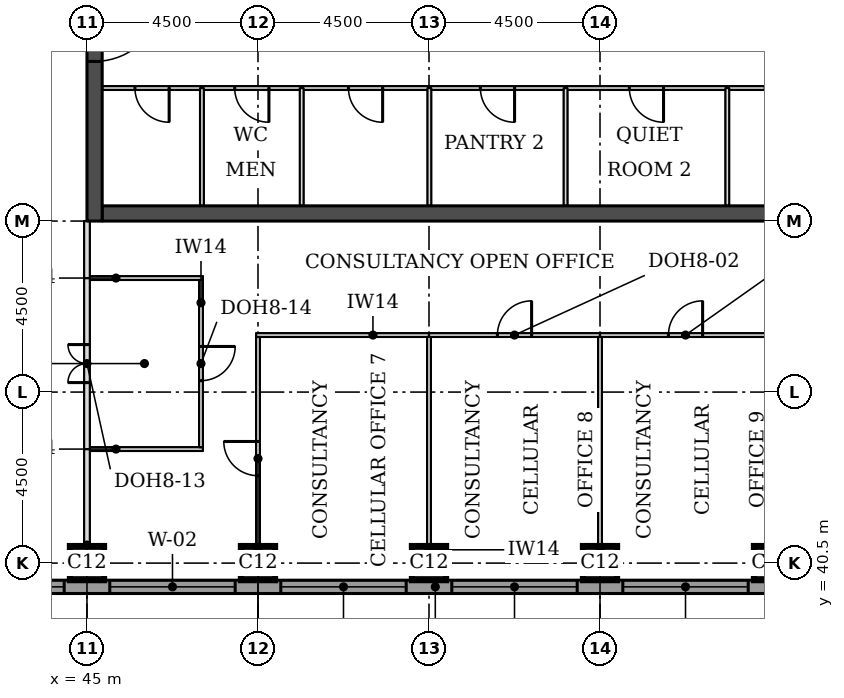
"""IFC4 building model, lengths in metres.
Left out: names, types, materials, properties, quantities, classifications, styles, units other than length and angle.
Written with IfcOpenShell. Run it as: python <this file> out.ifc"""

import sys

from ifc_helpers import new_model, si_unit, direction, frame, frame_2d, origin, origin_2d, place, context, subcontext, project, spatial, rectangle, extrude, element, fill, save


model = new_model("IFC4")
c1 = context("Model", 3, precision=1e-05, world=origin(), true_north=direction((0.0, 1.0)))
c2 = subcontext(c1, "Body", "Model", "MODEL_VIEW")
j1 = project(units=[si_unit("LENGTHUNIT", "METRE"), si_unit("PLANEANGLEUNIT", "RADIAN")], contexts=[c1])
p1 = place(None, origin())
s1 = spatial("IfcSite", under=j1, at=p1, CompositionType="ELEMENT")
p2 = place(p1, origin())
s2 = spatial("IfcBuilding", under=s1, at=p2, CompositionType="ELEMENT")
p3 = place(p2, frame((0.0, 0.0, 203.2)))
s3 = spatial("IfcBuildingStorey", under=s2, at=p3, CompositionType="ELEMENT", Elevation=203.2)
for number, where, z_axis, x_axis in (
    (1, (45.0, 40.5, 0.0), (0.0, 0.0, 1.0), (1.0, 0.0, 0.0)),
    (2, (49.5, 40.5, 0.0), (0.0, 0.0, 1.0), (1.0, 0.0, 0.0)),
    (3, (54.0, 40.5, 0.0), (0.0, 0.0, 1.0), (1.0, 0.0, 0.0)),
    (4, (58.5, 40.5, 0.0), (0.0, 0.0, 1.0), (1.0, 0.0, 0.0)),
    (5, (63.0, 40.5, 0.0), (0.0, 0.0, 1.0), (1.0, 0.0, 0.0)),
):
    element("IfcColumn", number, at=place(p3, frame(where, z_axis=z_axis, x_axis=x_axis)), inside=s3, PredefinedType="COLUMN", context=c2, shape_type="SweptSolid", body=[
        extrude(rectangle(XDim=0.9, YDim=0.9, at=origin_2d()), origin(), (0.0, 0.0, 1.0), 3.7),
    ])
p4 = place(p3, frame((45.4, 49.7, 0.0), z_axis=(0.0, 0.0, 1.0), x_axis=(1.0, 0.0, 0.0)))
e6 = element("IfcWall", 6, at=p4, inside=s3, PredefinedType="SHEAR", context=c2, shape_type="SweptSolid", body=[
    extrude(rectangle(XDim=21.7, YDim=0.4, at=frame_2d((10.85, 0.0))), origin(), (0.0, 0.0, 1.0), 3.7),
])
p5 = place(p3, frame((45.2, 49.5, 0.0), z_axis=(0.0, 0.0, 1.0), x_axis=(0.0, 1.0, 0.0)))
e7 = element("IfcWall", 7, at=p5, inside=s3, PredefinedType="SHEAR", context=c2, shape_type="SweptSolid", body=[
    extrude(rectangle(XDim=22.5, YDim=0.4, at=frame_2d((11.25, 0.0))), origin(), (0.0, 0.0, 1.0), 3.7),
])
p6 = place(p5, frame((4.2, 0.0, 0.0)))
e8 = element("IfcOpeningElement", 8, at=p6, cuts=e7, PredefinedType="OPENING", context=c2, shape_type="SweptSolid", body=[
    extrude(rectangle(XDim=1.8, YDim=2.1, at=frame_2d((0.9, 1.05))), frame((0.0, 0.21, 0.0), z_axis=(0.0, -1.0, 0.0), x_axis=(1.0, 0.0, 0.0)), (0.0, 0.0, 1.0), 0.42),
])
p7 = place(p5, frame((6.9, 0.0, 0.0)))
e9 = element("IfcOpeningElement", 9, at=p7, cuts=e7, PredefinedType="OPENING", context=c2, shape_type="SweptSolid", body=[
    extrude(rectangle(XDim=1.1, YDim=2.1, at=frame_2d((0.55, 1.05))), frame((0.0, 0.21, 0.0), z_axis=(0.0, -1.0, 0.0), x_axis=(1.0, 0.0, 0.0)), (0.0, 0.0, 1.0), 0.42),
])
p8 = place(p5, frame((13.6, 0.0, 0.0)))
e10 = element("IfcOpeningElement", 10, at=p8, cuts=e7, PredefinedType="OPENING", context=c2, shape_type="SweptSolid", body=[
    extrude(rectangle(XDim=1.1, YDim=2.1, at=frame_2d((0.55, 1.05))), frame((0.0, 0.21, 0.0), z_axis=(0.0, -1.0, 0.0), x_axis=(1.0, 0.0, 0.0)), (0.0, 0.0, 1.0), 0.42),
])
p9 = place(p5, frame((16.5, 0.0, 0.0)))
e11 = element("IfcOpeningElement", 11, at=p9, cuts=e7, PredefinedType="OPENING", context=c2, shape_type="SweptSolid", body=[
    extrude(rectangle(XDim=1.8, YDim=2.1, at=frame_2d((0.9, 1.05))), frame((0.0, 0.21, 0.0), z_axis=(0.0, -1.0, 0.0), x_axis=(1.0, 0.0, 0.0)), (0.0, 0.0, 1.0), 0.42),
])
p10 = place(p3, frame((36.0, 39.875, 0.0), z_axis=(0.0, 0.0, 1.0), x_axis=(1.0, 0.0, 0.0)))
e12 = element("IfcWall", 12, at=p10, inside=s3, PredefinedType="STANDARD", context=c2, shape_type="SweptSolid", body=[
    extrude(rectangle(XDim=36.331, YDim=0.35, at=frame_2d((18.166, 0.0))), origin(), (0.0, 0.0, 1.0), 3.525),
])
p11 = place(p10, frame((5.1, 0.0, 0.9)))
e13 = element("IfcOpeningElement", 13, at=p11, cuts=e12, PredefinedType="OPENING", context=c2, shape_type="SweptSolid", body=[
    extrude(rectangle(XDim=3.3, YDim=1.9, at=frame_2d((1.65, 0.95))), frame((0.0, 0.185, 0.0), z_axis=(0.0, -1.0, 0.0), x_axis=(1.0, 0.0, 0.0)), (0.0, 0.0, 1.0), 0.37),
])
p12 = place(p10, frame((9.6, 0.0, 0.9)))
e14 = element("IfcOpeningElement", 14, at=p12, cuts=e12, PredefinedType="OPENING", context=c2, shape_type="SweptSolid", body=[
    extrude(rectangle(XDim=3.3, YDim=1.9, at=frame_2d((1.65, 0.95))), frame((0.0, 0.185, 0.0), z_axis=(0.0, -1.0, 0.0), x_axis=(1.0, 0.0, 0.0)), (0.0, 0.0, 1.0), 0.37),
])
p13 = place(p10, frame((14.1, 0.0, 0.9)))
e15 = element("IfcOpeningElement", 15, at=p13, cuts=e12, PredefinedType="OPENING", context=c2, shape_type="SweptSolid", body=[
    extrude(rectangle(XDim=3.3, YDim=1.9, at=frame_2d((1.65, 0.95))), frame((0.0, 0.185, 0.0), z_axis=(0.0, -1.0, 0.0), x_axis=(1.0, 0.0, 0.0)), (0.0, 0.0, 1.0), 0.37),
])
p14 = place(p10, frame((18.6, 0.0, 0.9)))
e16 = element("IfcOpeningElement", 16, at=p14, cuts=e12, PredefinedType="OPENING", context=c2, shape_type="SweptSolid", body=[
    extrude(rectangle(XDim=3.3, YDim=1.9, at=frame_2d((1.65, 0.95))), frame((0.0, 0.185, 0.0), z_axis=(0.0, -1.0, 0.0), x_axis=(1.0, 0.0, 0.0)), (0.0, 0.0, 1.0), 0.37),
])
p15 = place(p10, frame((23.1, 0.0, 0.9)))
e17 = element("IfcOpeningElement", 17, at=p15, cuts=e12, PredefinedType="OPENING", context=c2, shape_type="SweptSolid", body=[
    extrude(rectangle(XDim=3.3, YDim=1.9, at=frame_2d((1.65, 0.95))), frame((0.0, 0.185, 0.0), z_axis=(0.0, -1.0, 0.0), x_axis=(1.0, 0.0, 0.0)), (0.0, 0.0, 1.0), 0.37),
])
p16 = place(p10, frame((27.6, 0.0, 0.9)))
e18 = element("IfcOpeningElement", 18, at=p16, cuts=e12, PredefinedType="OPENING", context=c2, shape_type="SweptSolid", body=[
    extrude(rectangle(XDim=3.3, YDim=1.9, at=frame_2d((1.65, 0.95))), frame((0.0, 0.185, 0.0), z_axis=(0.0, -1.0, 0.0), x_axis=(1.0, 0.0, 0.0)), (0.0, 0.0, 1.0), 0.37),
])
p17 = place(p3, frame((45.075, 43.5, 0.0), z_axis=(0.0, 0.0, 1.0), x_axis=(1.0, 0.0, 0.0)))
e19 = element("IfcWall", 19, at=p17, inside=s3, PredefinedType="PARTITIONING", context=c2, shape_type="SweptSolid", body=[
    extrude(rectangle(XDim=2.975, YDim=0.1, at=frame_2d((1.488, 0.0))), origin(), (0.0, 0.0, 1.0), 3.55),
])
p18 = place(p3, frame((49.45, 46.5, 0.0), z_axis=(0.0, 0.0, 1.0), x_axis=(1.0, 0.0, 0.0)))
e20 = element("IfcWall", 20, at=p18, inside=s3, PredefinedType="PARTITIONING", context=c2, shape_type="SweptSolid", body=[
    extrude(rectangle(XDim=4.55, YDim=0.1, at=frame_2d((2.275, 0.0))), origin(), (0.0, 0.0, 1.0), 3.55),
])
p19 = place(p3, frame((54.0, 46.5, 0.0), z_axis=(0.0, 0.0, 1.0), x_axis=(1.0, 0.0, 0.0)))
e21 = element("IfcWall", 21, at=p19, inside=s3, PredefinedType="PARTITIONING", context=c2, shape_type="SweptSolid", body=[
    extrude(rectangle(XDim=4.5, YDim=0.1, at=frame_2d((2.25, 0.0))), origin(), (0.0, 0.0, 1.0), 3.55),
])
p20 = place(p19, frame((1.8, 0.0, 0.0)))
e22 = element("IfcOpeningElement", 22, at=p20, cuts=e21, PredefinedType="OPENING", context=c2, shape_type="SweptSolid", body=[
    extrude(rectangle(XDim=0.9, YDim=2.1, at=frame_2d((0.45, 1.05))), frame((0.0, 0.06, 0.0), z_axis=(0.0, -1.0, 0.0), x_axis=(1.0, 0.0, 0.0)), (0.0, 0.0, 1.0), 0.12),
])
p21 = place(p3, frame((58.5, 46.5, 0.0), z_axis=(0.0, 0.0, 1.0), x_axis=(1.0, 0.0, 0.0)))
e23 = element("IfcWall", 23, at=p21, inside=s3, PredefinedType="PARTITIONING", context=c2, shape_type="SweptSolid", body=[
    extrude(rectangle(XDim=4.5, YDim=0.1, at=frame_2d((2.25, 0.0))), origin(), (0.0, 0.0, 1.0), 3.55),
])
p22 = place(p21, frame((1.8, 0.0, 0.0)))
e24 = element("IfcOpeningElement", 24, at=p22, cuts=e23, PredefinedType="OPENING", context=c2, shape_type="SweptSolid", body=[
    extrude(rectangle(XDim=0.9, YDim=2.1, at=frame_2d((0.45, 1.05))), frame((0.0, 0.06, 0.0), z_axis=(0.0, -1.0, 0.0), x_axis=(1.0, 0.0, 0.0)), (0.0, 0.0, 1.0), 0.12),
])
p23 = place(p3, frame((45.075, 48.0, 0.0), z_axis=(0.0, 0.0, 1.0), x_axis=(1.0, 0.0, 0.0)))
e25 = element("IfcWall", 25, at=p23, inside=s3, PredefinedType="PARTITIONING", context=c2, shape_type="SweptSolid", body=[
    extrude(rectangle(XDim=2.975, YDim=0.1, at=frame_2d((1.488, 0.0))), origin(), (0.0, 0.0, 1.0), 3.55),
])
p24 = place(p3, frame((45.0, 40.05, 0.0), z_axis=(0.0, 0.0, 1.0), x_axis=(0.0, 1.0, 0.0)))
e26 = element("IfcWall", 26, at=p24, inside=s3, PredefinedType="PARTITIONING", context=c2, shape_type="SweptSolid", body=[
    extrude(rectangle(XDim=3.45, YDim=0.15, at=frame_2d((1.725, 0.0))), origin(), (0.0, 0.0, 1.0), 2.938),
])
p25 = place(p3, frame((49.5, 40.05, 0.0), z_axis=(0.0, 0.0, 1.0), x_axis=(0.0, 1.0, 0.0)))
e27 = element("IfcWall", 27, at=p25, inside=s3, PredefinedType="PARTITIONING", context=c2, shape_type="SweptSolid", body=[
    extrude(rectangle(XDim=6.4, YDim=0.1, at=frame_2d((3.2, 0.0))), origin(), (0.0, 0.0, 1.0), 3.55),
])
p26 = place(p25, frame((2.75, 0.0, 0.0)))
e28 = element("IfcOpeningElement", 28, at=p26, cuts=e27, PredefinedType="OPENING", context=c2, shape_type="SweptSolid", body=[
    extrude(rectangle(XDim=0.9, YDim=2.1, at=frame_2d((0.45, 1.05))), frame((0.0, 0.06, 0.0), z_axis=(0.0, -1.0, 0.0), x_axis=(1.0, 0.0, 0.0)), (0.0, 0.0, 1.0), 0.12),
])
for number, where, z_axis, x_axis in (
    (29, (54.0, 40.05, 0.0), (0.0, 0.0, 1.0), (0.0, 1.0, 0.0)),
    (30, (58.5, 40.05, 0.0), (0.0, 0.0, 1.0), (0.0, 1.0, 0.0)),
):
    element("IfcWall", number, at=place(p3, frame(where, z_axis=z_axis, x_axis=x_axis)), inside=s3, PredefinedType="PARTITIONING", context=c2, shape_type="SweptSolid", body=[
        extrude(rectangle(XDim=6.4, YDim=0.1, at=frame_2d((3.2, 0.0))), origin(), (0.0, 0.0, 1.0), 3.55),
    ])
p27 = place(p3, frame((45.0, 43.5, 0.0), z_axis=(0.0, 0.0, 1.0), x_axis=(0.0, 1.0, 0.0)))
e31 = element("IfcWall", 31, at=p27, inside=s3, PredefinedType="PARTITIONING", context=c2, shape_type="SweptSolid", body=[
    extrude(rectangle(XDim=4.5, YDim=0.15, at=frame_2d((2.25, 0.0))), origin(), (0.0, 0.0, 1.0), 2.938),
])
p28 = place(p27, frame((1.75, 0.0, 0.0)))
e32 = element("IfcOpeningElement", 32, at=p28, cuts=e31, PredefinedType="OPENING", context=c2, shape_type="SweptSolid", body=[
    extrude(rectangle(XDim=1.0, YDim=2.1, at=frame_2d((0.5, 1.05))), frame((0.0, 0.085, 0.0), z_axis=(0.0, -1.0, 0.0), x_axis=(1.0, 0.0, 0.0)), (0.0, 0.0, 1.0), 0.17),
])
p29 = place(p3, frame((48.0, 43.55, 0.0), z_axis=(0.0, 0.0, 1.0), x_axis=(0.0, 1.0, 0.0)))
e33 = element("IfcWall", 33, at=p29, inside=s3, PredefinedType="PARTITIONING", context=c2, shape_type="SweptSolid", body=[
    extrude(rectangle(XDim=4.4, YDim=0.1, at=frame_2d((2.2, 0.0))), origin(), (0.0, 0.0, 1.0), 3.55),
])
p30 = place(p29, frame((1.75, 0.0, 0.0)))
e34 = element("IfcOpeningElement", 34, at=p30, cuts=e33, PredefinedType="OPENING", context=c2, shape_type="SweptSolid", body=[
    extrude(rectangle(XDim=0.9, YDim=2.1, at=frame_2d((0.45, 1.05))), frame((0.0, 0.06, 0.0), z_axis=(0.0, -1.0, 0.0), x_axis=(1.0, 0.0, 0.0)), (0.0, 0.0, 1.0), 0.12),
])
p31 = place(p3, frame((45.0, 48.0, 0.0), z_axis=(0.0, 0.0, 1.0), x_axis=(0.0, 1.0, 0.0)))
e35 = element("IfcWall", 35, at=p31, inside=s3, PredefinedType="PARTITIONING", context=c2, shape_type="SweptSolid", body=[
    extrude(rectangle(XDim=1.5, YDim=0.15, at=frame_2d((0.75, 0.0))), origin(), (0.0, 0.0, 1.0), 2.938),
])
p32 = place(p3, frame((45.4, 53.0, 0.0), z_axis=(0.0, 0.0, 1.0), x_axis=(1.0, 0.0, 0.0)))
e36 = element("IfcWall", 36, at=p32, inside=s3, PredefinedType="PARTITIONING", context=c2, shape_type="SweptSolid", body=[
    extrude(rectangle(XDim=21.7, YDim=0.1, at=frame_2d((10.85, 0.0))), origin(), (0.0, 0.0, 1.0), 3.55),
])
p33 = place(p32, frame((20.019, 0.0, 0.0)))
e37 = element("IfcOpeningElement", 37, at=p33, cuts=e36, PredefinedType="OPENING", context=c2, shape_type="SweptSolid", body=[
    extrude(rectangle(XDim=1.0, YDim=2.1, at=frame_2d((0.5, 1.05))), frame((0.0, 0.06, 0.0), z_axis=(0.0, -1.0, 0.0), x_axis=(1.0, 0.0, 0.0)), (0.0, 0.0, 1.0), 0.12),
])
p34 = place(p32, frame((17.444, 0.0, 0.0)))
e38 = element("IfcOpeningElement", 38, at=p34, cuts=e36, PredefinedType="OPENING", context=c2, shape_type="SweptSolid", body=[
    extrude(rectangle(XDim=0.9, YDim=2.1, at=frame_2d((0.45, 1.05))), frame((0.0, 0.06, 0.0), z_axis=(0.0, -1.0, 0.0), x_axis=(1.0, 0.0, 0.0)), (0.0, 0.0, 1.0), 0.12),
])
p35 = place(p32, frame((0.863, 0.0, 0.0)))
e39 = element("IfcOpeningElement", 39, at=p35, cuts=e36, PredefinedType="OPENING", context=c2, shape_type="SweptSolid", body=[
    extrude(rectangle(XDim=0.9, YDim=2.1, at=frame_2d((0.45, 1.05))), frame((0.0, 0.06, 0.0), z_axis=(0.0, -1.0, 0.0), x_axis=(1.0, 0.0, 0.0)), (0.0, 0.0, 1.0), 0.12),
])
p36 = place(p32, frame((3.488, 0.0, 0.0)))
e40 = element("IfcOpeningElement", 40, at=p36, cuts=e36, PredefinedType="OPENING", context=c2, shape_type="SweptSolid", body=[
    extrude(rectangle(XDim=0.9, YDim=2.1, at=frame_2d((0.45, 1.05))), frame((0.0, 0.06, 0.0), z_axis=(0.0, -1.0, 0.0), x_axis=(1.0, 0.0, 0.0)), (0.0, 0.0, 1.0), 0.12),
])
p37 = place(p32, frame((6.48, 0.0, 0.0)))
e41 = element("IfcOpeningElement", 41, at=p37, cuts=e36, PredefinedType="OPENING", context=c2, shape_type="SweptSolid", body=[
    extrude(rectangle(XDim=0.9, YDim=2.1, at=frame_2d((0.45, 1.05))), frame((0.0, 0.06, 0.0), z_axis=(0.0, -1.0, 0.0), x_axis=(1.0, 0.0, 0.0)), (0.0, 0.0, 1.0), 0.12),
])
p38 = place(p32, frame((9.952, 0.0, 0.0)))
e42 = element("IfcOpeningElement", 42, at=p38, cuts=e36, PredefinedType="OPENING", context=c2, shape_type="SweptSolid", body=[
    extrude(rectangle(XDim=0.9, YDim=2.1, at=frame_2d((0.45, 1.05))), frame((0.0, 0.06, 0.0), z_axis=(0.0, -1.0, 0.0), x_axis=(1.0, 0.0, 0.0)), (0.0, 0.0, 1.0), 0.12),
])
p39 = place(p32, frame((13.872, 0.0, 0.0)))
e43 = element("IfcOpeningElement", 43, at=p39, cuts=e36, PredefinedType="OPENING", context=c2, shape_type="SweptSolid", body=[
    extrude(rectangle(XDim=0.9, YDim=2.1, at=frame_2d((0.45, 1.05))), frame((0.0, 0.06, 0.0), z_axis=(0.0, -1.0, 0.0), x_axis=(1.0, 0.0, 0.0)), (0.0, 0.0, 1.0), 0.12),
])
for number, where, z_axis, x_axis in (
    (44, (48.025, 49.9, 0.0), (0.0, 0.0, 1.0), (0.0, 1.0, 0.0)),
    (45, (50.65, 49.9, 0.0), (0.0, 0.0, 1.0), (0.0, 1.0, 0.0)),
    (46, (54.01, 49.9, 0.0), (0.0, 0.0, 1.0), (0.0, 1.0, 0.0)),
    (47, (57.594, 49.9, 0.0), (0.0, 0.0, 1.0), (0.0, 1.0, 0.0)),
    (48, (61.85, 49.9, 0.0), (0.0, 0.0, 1.0), (0.0, 1.0, 0.0)),
):
    element("IfcWall", number, at=place(p3, frame(where, z_axis=z_axis, x_axis=x_axis)), inside=s3, PredefinedType="PARTITIONING", context=c2, shape_type="SweptSolid", body=[
        extrude(rectangle(XDim=3.1, YDim=0.1, at=frame_2d((1.55, 0.0))), origin(), (0.0, 0.0, 1.0), 3.55),
    ])
p40 = place(p11, origin())
e49 = element("IfcWindow", 49, at=p40, inside=s3, PartitioningType="SINGLE_PANEL", PredefinedType="WINDOW", context=c2, shape_type="SweptSolid", body=[
    extrude(rectangle(XDim=3.3, YDim=1.9, at=frame_2d((1.65, 0.95))), frame((0.0, 0.085, 0.0), z_axis=(0.0, -1.0, 0.0), x_axis=(1.0, 0.0, 0.0)), (0.0, 0.0, 1.0), 0.06),
])
fill(e13, e49)
p41 = place(p12, origin())
e50 = element("IfcWindow", 50, at=p41, inside=s3, PartitioningType="SINGLE_PANEL", PredefinedType="WINDOW", context=c2, shape_type="SweptSolid", body=[
    extrude(rectangle(XDim=3.3, YDim=1.9, at=frame_2d((1.65, 0.95))), frame((0.0, 0.085, 0.0), z_axis=(0.0, -1.0, 0.0), x_axis=(1.0, 0.0, 0.0)), (0.0, 0.0, 1.0), 0.06),
])
fill(e14, e50)
p42 = place(p13, origin())
e51 = element("IfcWindow", 51, at=p42, inside=s3, PartitioningType="SINGLE_PANEL", PredefinedType="WINDOW", context=c2, shape_type="SweptSolid", body=[
    extrude(rectangle(XDim=3.3, YDim=1.9, at=frame_2d((1.65, 0.95))), frame((0.0, 0.085, 0.0), z_axis=(0.0, -1.0, 0.0), x_axis=(1.0, 0.0, 0.0)), (0.0, 0.0, 1.0), 0.06),
])
fill(e15, e51)
p43 = place(p14, origin())
e52 = element("IfcWindow", 52, at=p43, inside=s3, PartitioningType="SINGLE_PANEL", PredefinedType="WINDOW", context=c2, shape_type="SweptSolid", body=[
    extrude(rectangle(XDim=3.3, YDim=1.9, at=frame_2d((1.65, 0.95))), frame((0.0, 0.085, 0.0), z_axis=(0.0, -1.0, 0.0), x_axis=(1.0, 0.0, 0.0)), (0.0, 0.0, 1.0), 0.06),
])
fill(e16, e52)
p44 = place(p15, origin())
e53 = element("IfcWindow", 53, at=p44, inside=s3, PartitioningType="SINGLE_PANEL", PredefinedType="WINDOW", context=c2, shape_type="SweptSolid", body=[
    extrude(rectangle(XDim=3.3, YDim=1.9, at=frame_2d((1.65, 0.95))), frame((0.0, 0.085, 0.0), z_axis=(0.0, -1.0, 0.0), x_axis=(1.0, 0.0, 0.0)), (0.0, 0.0, 1.0), 0.06),
])
fill(e17, e53)
p45 = place(p28, origin())
e54 = element("IfcDoor", 54, at=p45, inside=s3, OperationType="DOUBLE_DOOR_SINGLE_SWING", PredefinedType="DOOR", context=c2, shape_type="SweptSolid", body=[
    extrude(rectangle(XDim=1.0, YDim=2.1, at=frame_2d((0.5, 1.05))), frame((0.0, 0.025, 0.0), z_axis=(0.0, -1.0, 0.0), x_axis=(1.0, 0.0, 0.0)), (0.0, 0.0, 1.0), 0.05),
])
fill(e32, e54)
p46 = place(p30, frame((0.9, 0.0, 0.0), z_axis=(0.0, 0.0, 1.0), x_axis=(-1.0, 0.0, 0.0)))
e55 = element("IfcDoor", 55, at=p46, inside=s3, OperationType="SINGLE_SWING_LEFT", PredefinedType="DOOR", context=c2, shape_type="SweptSolid", body=[
    extrude(rectangle(XDim=0.9, YDim=2.1, at=frame_2d((0.45, 1.05))), frame((0.0, 0.025, 0.0), z_axis=(0.0, -1.0, 0.0), x_axis=(1.0, 0.0, 0.0)), (0.0, 0.0, 1.0), 0.05),
])
fill(e34, e55)
p47 = place(p26, origin())
e56 = element("IfcDoor", 56, at=p47, inside=s3, OperationType="SINGLE_SWING_RIGHT", PredefinedType="DOOR", context=c2, shape_type="SweptSolid", body=[
    extrude(rectangle(XDim=0.9, YDim=2.1, at=frame_2d((0.45, 1.05))), frame((0.0, 0.025, 0.0), z_axis=(0.0, -1.0, 0.0), x_axis=(1.0, 0.0, 0.0)), (0.0, 0.0, 1.0), 0.05),
])
fill(e28, e56)
p48 = place(p20, origin())
e57 = element("IfcDoor", 57, at=p48, inside=s3, OperationType="SINGLE_SWING_RIGHT", PredefinedType="DOOR", context=c2, shape_type="SweptSolid", body=[
    extrude(rectangle(XDim=0.9, YDim=2.1, at=frame_2d((0.45, 1.05))), frame((0.0, 0.025, 0.0), z_axis=(0.0, -1.0, 0.0), x_axis=(1.0, 0.0, 0.0)), (0.0, 0.0, 1.0), 0.05),
])
fill(e22, e57)
p49 = place(p22, origin())
e58 = element("IfcDoor", 58, at=p49, inside=s3, OperationType="SINGLE_SWING_RIGHT", PredefinedType="DOOR", context=c2, shape_type="SweptSolid", body=[
    extrude(rectangle(XDim=0.9, YDim=2.1, at=frame_2d((0.45, 1.05))), frame((0.0, 0.025, 0.0), z_axis=(0.0, -1.0, 0.0), x_axis=(1.0, 0.0, 0.0)), (0.0, 0.0, 1.0), 0.05),
])
fill(e24, e58)
p50 = place(p6, frame((1.8, 0.0, 0.0), z_axis=(0.0, 0.0, 1.0), x_axis=(-1.0, 0.0, 0.0)))
e59 = element("IfcDoor", 59, at=p50, inside=s3, OperationType="SINGLE_SWING_LEFT", PredefinedType="DOOR", context=c2, shape_type="SweptSolid", body=[
    extrude(rectangle(XDim=1.8, YDim=2.1, at=frame_2d((0.9, 1.05))), frame((0.0, 0.025, 0.0), z_axis=(0.0, -1.0, 0.0), x_axis=(1.0, 0.0, 0.0)), (0.0, 0.0, 1.0), 0.05),
])
fill(e8, e59)
p51 = place(p35, frame((0.9, 0.0, 0.0), z_axis=(0.0, 0.0, 1.0), x_axis=(-1.0, 0.0, 0.0)))
e60 = element("IfcDoor", 60, at=p51, inside=s3, OperationType="SINGLE_SWING_LEFT", PredefinedType="DOOR", context=c2, shape_type="SweptSolid", body=[
    extrude(rectangle(XDim=0.9, YDim=2.1, at=frame_2d((0.45, 1.05))), frame((0.0, 0.025, 0.0), z_axis=(0.0, -1.0, 0.0), x_axis=(1.0, 0.0, 0.0)), (0.0, 0.0, 1.0), 0.05),
])
fill(e39, e60)
p52 = place(p36, frame((0.9, 0.0, 0.0), z_axis=(0.0, 0.0, 1.0), x_axis=(-1.0, 0.0, 0.0)))
e61 = element("IfcDoor", 61, at=p52, inside=s3, OperationType="SINGLE_SWING_LEFT", PredefinedType="DOOR", context=c2, shape_type="SweptSolid", body=[
    extrude(rectangle(XDim=0.9, YDim=2.1, at=frame_2d((0.45, 1.05))), frame((0.0, 0.025, 0.0), z_axis=(0.0, -1.0, 0.0), x_axis=(1.0, 0.0, 0.0)), (0.0, 0.0, 1.0), 0.05),
])
fill(e40, e61)
p53 = place(p37, frame((0.9, 0.0, 0.0), z_axis=(0.0, 0.0, 1.0), x_axis=(-1.0, 0.0, 0.0)))
e62 = element("IfcDoor", 62, at=p53, inside=s3, OperationType="SINGLE_SWING_LEFT", PredefinedType="DOOR", context=c2, shape_type="SweptSolid", body=[
    extrude(rectangle(XDim=0.9, YDim=2.1, at=frame_2d((0.45, 1.05))), frame((0.0, 0.025, 0.0), z_axis=(0.0, -1.0, 0.0), x_axis=(1.0, 0.0, 0.0)), (0.0, 0.0, 1.0), 0.05),
])
fill(e41, e62)
p54 = place(p38, frame((0.9, 0.0, 0.0), z_axis=(0.0, 0.0, 1.0), x_axis=(-1.0, 0.0, 0.0)))
e63 = element("IfcDoor", 63, at=p54, inside=s3, OperationType="SINGLE_SWING_LEFT", PredefinedType="DOOR", context=c2, shape_type="SweptSolid", body=[
    extrude(rectangle(XDim=0.9, YDim=2.1, at=frame_2d((0.45, 1.05))), frame((0.0, 0.025, 0.0), z_axis=(0.0, -1.0, 0.0), x_axis=(1.0, 0.0, 0.0)), (0.0, 0.0, 1.0), 0.05),
])
fill(e42, e63)
p55 = place(p39, frame((0.9, 0.0, 0.0), z_axis=(0.0, 0.0, 1.0), x_axis=(-1.0, 0.0, 0.0)))
e64 = element("IfcDoor", 64, at=p55, inside=s3, OperationType="SINGLE_SWING_LEFT", PredefinedType="DOOR", context=c2, shape_type="SweptSolid", body=[
    extrude(rectangle(XDim=0.9, YDim=2.1, at=frame_2d((0.45, 1.05))), frame((0.0, 0.025, 0.0), z_axis=(0.0, -1.0, 0.0), x_axis=(1.0, 0.0, 0.0)), (0.0, 0.0, 1.0), 0.05),
])
fill(e43, e64)
save(model, sys.argv[1])
